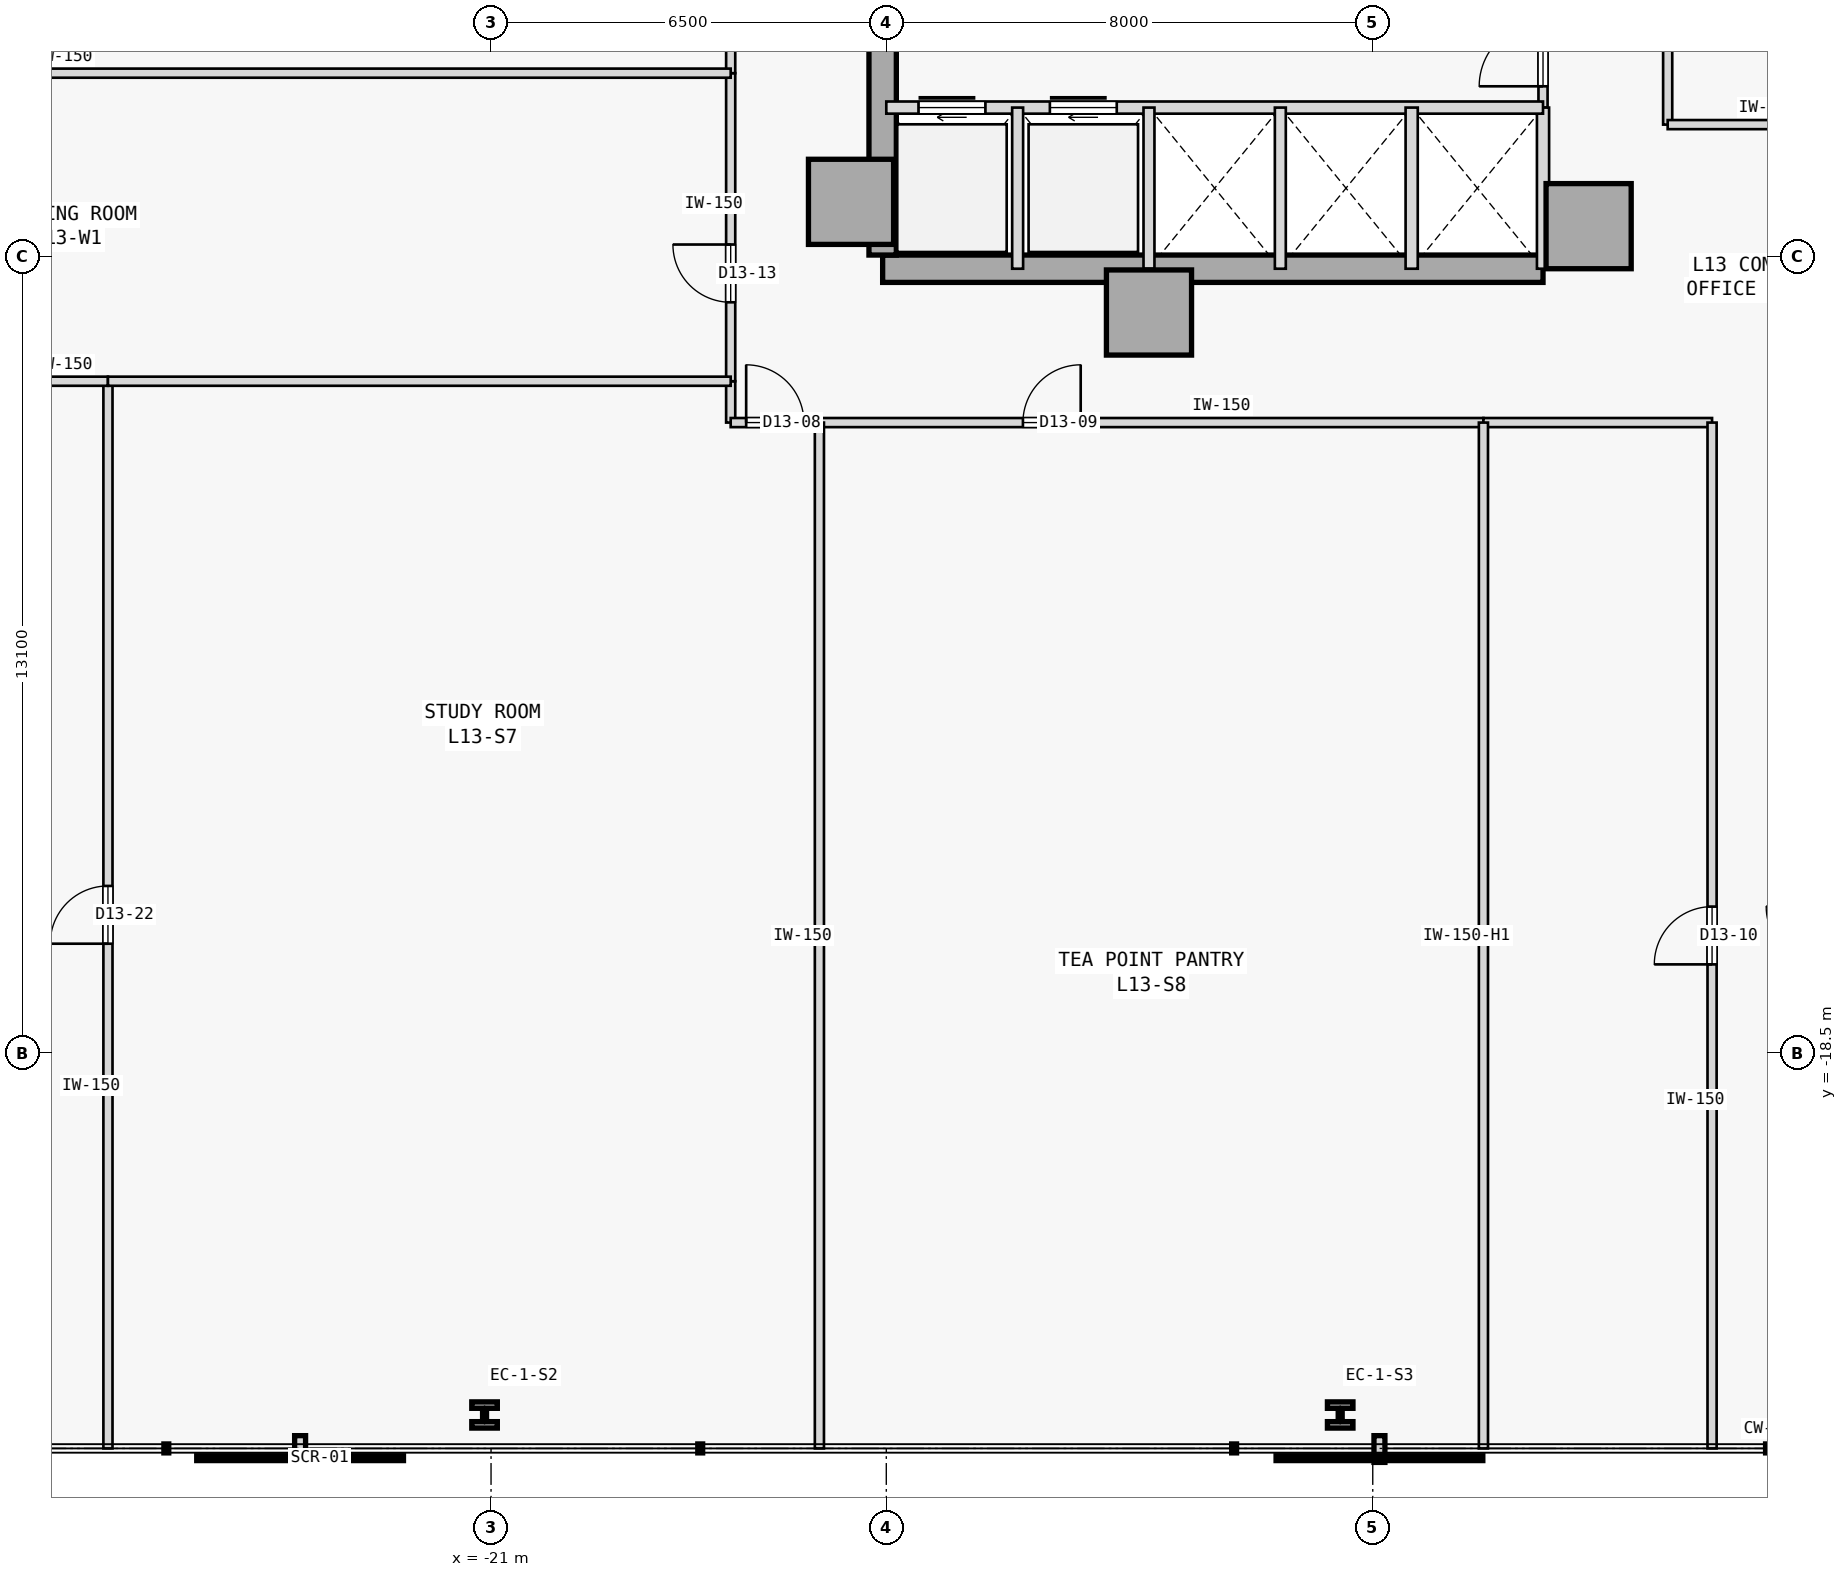
"""IFC4 building model, lengths in metres.
Left out: names, types, materials, properties, quantities, classifications, styles, units other than length and angle.
Written with IfcOpenShell. Run it as: python <this file> out.ifc"""

import sys

from ifc_helpers import new_model, si_unit, direction, frame, frame_2d, origin, origin_2d, place, context, subcontext, project, spatial, rectangle, i_section, extrude, element, fill, save


model = new_model("IFC4")
c1 = context("Model", 3, precision=1e-05, world=origin(), true_north=direction((0.0, 1.0)))
c2 = subcontext(c1, "Body", "Model", "MODEL_VIEW")
j1 = project(units=[si_unit("LENGTHUNIT", "METRE"), si_unit("PLANEANGLEUNIT", "RADIAN")], contexts=[c1])
p1 = place(None, origin())
s1 = spatial("IfcSite", under=j1, at=p1, CompositionType="ELEMENT")
p2 = place(p1, origin())
s2 = spatial("IfcBuilding", under=s1, at=p2, CompositionType="ELEMENT")
p3 = place(p2, frame((0.0, 0.0, 56.0)))
s3 = spatial("IfcBuildingStorey", under=s2, at=p3, CompositionType="ELEMENT", Elevation=56.0)
for number, where, z_axis, x_axis in (
    (1, (-15.08, -4.5, 0.0), (0.0, 0.0, 1.0), (1.0, 0.0, 0.0)),
    (2, (-10.18, -6.32, 0.0), (0.0, 0.0, 1.0), (1.0, 0.0, 0.0)),
    (3, (-2.95, -4.9, 0.0), (0.0, 0.0, 1.0), (1.0, 0.0, 0.0)),
):
    element("IfcColumn", number, at=place(p3, frame(where, z_axis=z_axis, x_axis=x_axis)), inside=s3, PredefinedType="COLUMN", context=c2, shape_type="SweptSolid", body=[
        extrude(rectangle(XDim=1.4, YDim=1.4, at=origin_2d()), origin(), (0.0, 0.0, 1.0), 3.8),
    ])
p4 = place(p3, frame((-14.56, -5.6, 0.0), z_axis=(0.0, 0.0, 1.0), x_axis=(1.0, 0.0, 0.0)))
e4 = element("IfcWall", 4, at=p4, inside=s3, PredefinedType="SHEAR", context=c2, shape_type="SweptSolid", body=[
    extrude(rectangle(XDim=10.86, YDim=0.45, at=frame_2d((5.43, 0.0))), origin(), (0.0, 0.0, 1.0), 3.575),
])
p5 = place(p3, frame((-14.56, -5.375, 0.0), z_axis=(0.0, 0.0, 1.0), x_axis=(0.0, 1.0, 0.0)))
e5 = element("IfcWall", 5, at=p5, inside=s3, PredefinedType="SHEAR", context=c2, shape_type="SweptSolid", body=[
    extrude(rectangle(XDim=10.75, YDim=0.45, at=frame_2d((5.375, 0.0))), origin(), (0.0, 0.0, 1.0), 3.575),
])
for number, where, z_axis, x_axis in (
    (6, (-21.107, -24.45, 0.0), (0.0, 0.0, 1.0), (1.0, 0.0, 0.0)),
    (7, (-7.036, -24.45, 0.0), (0.0, 0.0, 1.0), (1.0, 0.0, 0.0)),
):
    element("IfcColumn", number, at=place(p3, frame(where, z_axis=z_axis, x_axis=x_axis)), inside=s3, PredefinedType="COLUMN", context=c2, shape_type="SweptSolid", body=[
        extrude(i_section(OverallWidth=0.42, OverallDepth=0.431, WebThickness=0.065, FlangeThickness=0.106, FilletRadius=0.015, at=origin_2d()), origin(), (0.0, 0.0, 1.0), 3.8),
    ])
p6 = place(p3, frame((-3.7, -2.95, 0.0), z_axis=(0.0, 0.0, 1.0), x_axis=(0.0, 1.0, 0.0)))
e8 = element("IfcWall", 8, at=p6, inside=s3, PredefinedType="PARTITIONING", context=c2, shape_type="SweptSolid", body=[
    extrude(rectangle(XDim=1.8, YDim=0.15, at=frame_2d((0.9, 0.0))), origin(), (0.0, 0.0, 1.0), 3.575),
])
p7 = place(p6, frame((0.35, 0.0, 0.0)))
e9 = element("IfcOpeningElement", 9, at=p7, cuts=e8, PredefinedType="OPENING", context=c2, shape_type="SweptSolid", body=[
    extrude(rectangle(XDim=1.05, YDim=2.18, at=frame_2d((0.525, 1.09))), frame((0.0, 0.085, 0.0), z_axis=(0.0, -1.0, 0.0), x_axis=(1.0, 0.0, 0.0)), (0.0, 0.0, 1.0), 0.17),
])
p8 = place(p3, frame((-3.7, -5.6, 0.0), z_axis=(0.0, 0.0, 1.0), x_axis=(0.0, 1.0, 0.0)))
e10 = element("IfcWall", 10, at=p8, inside=s3, PredefinedType="STANDARD", context=c2, shape_type="SweptSolid", body=[
    extrude(rectangle(XDim=2.65, YDim=0.2, at=frame_2d((1.325, 0.0))), origin(), (0.0, 0.0, 1.0), 3.575),
])
p9 = place(p3, frame((-14.5, -2.95, 0.0), z_axis=(0.0, 0.0, 1.0), x_axis=(1.0, 0.0, 0.0)))
e11 = element("IfcWall", 11, at=p9, inside=s3, PredefinedType="STANDARD", context=c2, shape_type="SweptSolid", body=[
    extrude(rectangle(XDim=10.8, YDim=0.2, at=frame_2d((5.4, 0.0))), origin(), (0.0, 0.0, 1.0), 3.575),
])
p10 = place(p9, frame((0.53, 0.0, 0.0)))
e12 = element("IfcOpeningElement", 12, at=p10, cuts=e11, PredefinedType="OPENING", context=c2, shape_type="SweptSolid", body=[
    extrude(rectangle(XDim=1.1, YDim=2.15, at=frame_2d((0.55, 1.075))), frame((0.0, 0.11, 0.0), z_axis=(0.0, -1.0, 0.0), x_axis=(1.0, 0.0, 0.0)), (0.0, 0.0, 1.0), 0.22),
])
p11 = place(p9, frame((2.69, 0.0, 0.0)))
e13 = element("IfcOpeningElement", 13, at=p11, cuts=e11, PredefinedType="OPENING", context=c2, shape_type="SweptSolid", body=[
    extrude(rectangle(XDim=1.1, YDim=2.15, at=frame_2d((0.55, 1.075))), frame((0.0, 0.11, 0.0), z_axis=(0.0, -1.0, 0.0), x_axis=(1.0, 0.0, 0.0)), (0.0, 0.0, 1.0), 0.22),
])
p12 = place(p3, frame((-5.86, -5.6, 0.0), z_axis=(0.0, 0.0, 1.0), x_axis=(0.0, 1.0, 0.0)))
e14 = element("IfcWall", 14, at=p12, inside=s3, PredefinedType="STANDARD", context=c2, shape_type="SweptSolid", body=[
    extrude(rectangle(XDim=2.65, YDim=0.2, at=frame_2d((1.325, 0.0))), origin(), (0.0, 0.0, 1.0), 3.575),
])
for number, where, z_axis, x_axis in (
    (15, (-12.34, -5.6, 0.0), (0.0, 0.0, 1.0), (0.0, 1.0, 0.0)),
    (16, (-10.18, -5.6, 0.0), (0.0, 0.0, 1.0), (0.0, 1.0, 0.0)),
    (17, (-8.02, -5.6, 0.0), (0.0, 0.0, 1.0), (0.0, 1.0, 0.0)),
):
    element("IfcWall", number, at=place(p3, frame(where, z_axis=z_axis, x_axis=x_axis)), inside=s3, PredefinedType="STANDARD", context=c2, shape_type="SweptSolid", body=[
        extrude(rectangle(XDim=2.65, YDim=0.18, at=frame_2d((1.325, 0.0))), origin(), (0.0, 0.0, 1.0), 3.575),
    ])
p13 = place(p3, frame((-1.65, -3.23, 0.0), z_axis=(0.0, 0.0, 1.0), x_axis=(0.0, 1.0, 0.0)))
e18 = element("IfcWall", 18, at=p13, inside=s3, PredefinedType="PARTITIONING", context=c2, shape_type="SweptSolid", body=[
    extrude(rectangle(XDim=6.46, YDim=0.15, at=frame_2d((3.23, 0.0))), origin(), (0.0, 0.0, 1.0), 3.575),
])
p14 = place(p13, frame((2.755, 0.0, 0.0)))
e19 = element("IfcOpeningElement", 19, at=p14, cuts=e18, PredefinedType="OPENING", context=c2, shape_type="SweptSolid", body=[
    extrude(rectangle(XDim=0.95, YDim=2.15, at=frame_2d((0.475, 1.075))), frame((0.0, 0.085, 0.0), z_axis=(0.0, -1.0, 0.0), x_axis=(1.0, 0.0, 0.0)), (0.0, 0.0, 1.0), 0.17),
])
p15 = place(p3, frame((-1.65, -3.23, 0.0), z_axis=(0.0, 0.0, 1.0), x_axis=(1.0, 0.0, 0.0)))
e20 = element("IfcWall", 20, at=p15, inside=s3, PredefinedType="PARTITIONING", context=c2, shape_type="SweptSolid", body=[
    extrude(rectangle(XDim=3.3, YDim=0.15, at=frame_2d((1.65, 0.0))), origin(), (0.0, 0.0, 1.0), 3.575),
])
p16 = place(p3, frame((-17.059, -8.13, 0.0), z_axis=(0.0, 0.0, 1.0), x_axis=(0.0, 1.0, 0.0)))
e21 = element("IfcWall", 21, at=p16, inside=s3, PredefinedType="PARTITIONING", context=c2, shape_type="SweptSolid", body=[
    extrude(rectangle(XDim=0.68, YDim=0.15, at=frame_2d((0.34, 0.0))), origin(), (0.0, 0.0, 1.0), 3.575),
])
p17 = place(p3, frame((-17.059, -8.13, 0.0), z_axis=(0.0, 0.0, 1.0), x_axis=(1.0, 0.0, 0.0)))
e22 = element("IfcWall", 22, at=p17, inside=s3, PredefinedType="PARTITIONING", context=c2, shape_type="SweptSolid", body=[
    extrude(rectangle(XDim=1.459, YDim=0.15, at=frame_2d((0.729, 0.0))), origin(), (0.0, 0.0, 1.0), 3.575),
])
p18 = place(p17, frame((0.254, 0.0, 0.0)))
e23 = element("IfcOpeningElement", 23, at=p18, cuts=e22, PredefinedType="OPENING", context=c2, shape_type="SweptSolid", body=[
    extrude(rectangle(XDim=0.95, YDim=2.15, at=frame_2d((0.475, 1.075))), frame((0.0, 0.085, 0.0), z_axis=(0.0, -1.0, 0.0), x_axis=(1.0, 0.0, 0.0)), (0.0, 0.0, 1.0), 0.17),
])
p19 = place(p3, frame((-15.6, -8.13, 0.0), z_axis=(0.0, 0.0, 1.0), x_axis=(1.0, 0.0, 0.0)))
e24 = element("IfcWall", 24, at=p19, inside=s3, PredefinedType="PARTITIONING", context=c2, shape_type="SweptSolid", body=[
    extrude(rectangle(XDim=10.92, YDim=0.15, at=frame_2d((5.46, 0.0))), origin(), (0.0, 0.0, 1.0), 3.575),
])
p20 = place(p19, frame((3.347, 0.0, 0.0)))
e25 = element("IfcOpeningElement", 25, at=p20, cuts=e24, PredefinedType="OPENING", context=c2, shape_type="SweptSolid", body=[
    extrude(rectangle(XDim=0.95, YDim=2.15, at=frame_2d((0.475, 1.075))), frame((0.0, 0.085, 0.0), z_axis=(0.0, -1.0, 0.0), x_axis=(1.0, 0.0, 0.0)), (0.0, 0.0, 1.0), 0.17),
])
p21 = place(p3, frame((-4.68, -8.13, 0.0), z_axis=(0.0, 0.0, 1.0), x_axis=(1.0, 0.0, 0.0)))
e26 = element("IfcWall", 26, at=p21, inside=s3, PredefinedType="PARTITIONING", context=c2, shape_type="SweptSolid", body=[
    extrude(rectangle(XDim=3.76, YDim=0.15, at=frame_2d((1.88, 0.0))), origin(), (0.0, 0.0, 1.0), 3.575),
])
p22 = place(p3, frame((-0.92, -25.0, 0.0), z_axis=(0.0, 0.0, 1.0), x_axis=(0.0, 1.0, 0.0)))
e27 = element("IfcWall", 27, at=p22, inside=s3, PredefinedType="PARTITIONING", context=c2, shape_type="SweptSolid", body=[
    extrude(rectangle(XDim=16.87, YDim=0.15, at=frame_2d((8.435, 0.0))), origin(), (0.0, 0.0, 1.0), 3.575),
])
p23 = place(p22, frame((7.96, 0.0, 0.0)))
e28 = element("IfcOpeningElement", 28, at=p23, cuts=e27, PredefinedType="OPENING", context=c2, shape_type="SweptSolid", body=[
    extrude(rectangle(XDim=0.95, YDim=2.15, at=frame_2d((0.475, 1.075))), frame((0.0, 0.085, 0.0), z_axis=(0.0, -1.0, 0.0), x_axis=(1.0, 0.0, 0.0)), (0.0, 0.0, 1.0), 0.17),
])
p24 = place(p3, frame((-17.059, -7.45, 0.0), z_axis=(0.0, 0.0, 1.0), x_axis=(0.0, 1.0, 0.0)))
e29 = element("IfcWall", 29, at=p24, inside=s3, PredefinedType="PARTITIONING", context=c2, shape_type="SweptSolid", body=[
    extrude(rectangle(XDim=5.066, YDim=0.15, at=frame_2d((2.533, 0.0))), origin(), (0.0, 0.0, 1.0), 3.575),
])
p25 = place(p24, frame((1.298, 0.0, 0.0)))
e30 = element("IfcOpeningElement", 30, at=p25, cuts=e29, PredefinedType="OPENING", context=c2, shape_type="SweptSolid", body=[
    extrude(rectangle(XDim=0.95, YDim=2.15, at=frame_2d((0.475, 1.075))), frame((0.0, 0.085, 0.0), z_axis=(0.0, -1.0, 0.0), x_axis=(1.0, 0.0, 0.0)), (0.0, 0.0, 1.0), 0.17),
])
p26 = place(p3, frame((-17.059, -2.384, 0.0), z_axis=(0.0, 0.0, 1.0), x_axis=(0.0, 1.0, 0.0)))
e31 = element("IfcWall", 31, at=p26, inside=s3, PredefinedType="PARTITIONING", context=c2, shape_type="SweptSolid", body=[
    extrude(rectangle(XDim=1.464, YDim=0.15, at=frame_2d((0.732, 0.0))), origin(), (0.0, 0.0, 1.0), 3.575),
])
p27 = place(p3, frame((-27.3, -25.0, 0.0), z_axis=(0.0, 0.0, 1.0), x_axis=(0.0, 1.0, 0.0)))
e32 = element("IfcWall", 32, at=p27, inside=s3, PredefinedType="PARTITIONING", context=c2, shape_type="SweptSolid", body=[
    extrude(rectangle(XDim=17.55, YDim=0.15, at=frame_2d((8.775, 0.0))), origin(), (0.0, 0.0, 1.0), 3.575),
])
p28 = place(p27, frame((8.3, 0.0, 0.0)))
e33 = element("IfcOpeningElement", 33, at=p28, cuts=e32, PredefinedType="OPENING", context=c2, shape_type="SweptSolid", body=[
    extrude(rectangle(XDim=0.95, YDim=2.15, at=frame_2d((0.475, 1.075))), frame((0.0, 0.085, 0.0), z_axis=(0.0, -1.0, 0.0), x_axis=(1.0, 0.0, 0.0)), (0.0, 0.0, 1.0), 0.17),
])
p29 = place(p3, frame((-39.0, -7.45, 0.0), z_axis=(0.0, 0.0, 1.0), x_axis=(1.0, 0.0, 0.0)))
e34 = element("IfcWall", 34, at=p29, inside=s3, PredefinedType="PARTITIONING", context=c2, shape_type="SweptSolid", body=[
    extrude(rectangle(XDim=11.7, YDim=0.15, at=frame_2d((5.85, 0.0))), origin(), (0.0, 0.0, 1.0), 3.575),
])
p30 = place(p3, frame((-15.6, -25.0, 0.0), z_axis=(0.0, 0.0, 1.0), x_axis=(0.0, 1.0, 0.0)))
e35 = element("IfcWall", 35, at=p30, inside=s3, PredefinedType="PARTITIONING", context=c2, shape_type="SweptSolid", body=[
    extrude(rectangle(XDim=16.87, YDim=0.15, at=frame_2d((8.435, 0.0))), origin(), (0.0, 0.0, 1.0), 3.575),
])
p31 = place(p3, frame((-27.3, -7.45, 0.0), z_axis=(0.0, 0.0, 1.0), x_axis=(1.0, 0.0, 0.0)))
e36 = element("IfcWall", 36, at=p31, inside=s3, PredefinedType="PARTITIONING", context=c2, shape_type="SweptSolid", body=[
    extrude(rectangle(XDim=10.241, YDim=0.15, at=frame_2d((5.121, 0.0))), origin(), (0.0, 0.0, 1.0), 3.575),
])
p32 = place(p3, frame((-4.68, -25.0, 0.0), z_axis=(0.0, 0.0, 1.0), x_axis=(0.0, 1.0, 0.0)))
e37 = element("IfcWall", 37, at=p32, inside=s3, PredefinedType="PARTITIONING", context=c2, shape_type="SweptSolid", body=[
    extrude(rectangle(XDim=16.87, YDim=0.15, at=frame_2d((8.435, 0.0))), origin(), (0.0, 0.0, 1.0), 3.125),
])
p33 = place(p3, frame((-39.0, -2.384, 0.0), z_axis=(0.0, 0.0, 1.0), x_axis=(1.0, 0.0, 0.0)))
e38 = element("IfcWall", 38, at=p33, inside=s3, PredefinedType="PARTITIONING", context=c2, shape_type="SweptSolid", body=[
    extrude(rectangle(XDim=21.941, YDim=0.15, at=frame_2d((10.97, 0.0))), origin(), (0.0, 0.0, 1.0), 3.575),
])
p34 = place(p7, origin())
e39 = element("IfcDoor", 39, at=p34, inside=s3, OperationType="SINGLE_SWING_LEFT", PredefinedType="DOOR", context=c2, shape_type="SweptSolid", body=[
    extrude(rectangle(XDim=1.05, YDim=2.18, at=frame_2d((0.525, 1.09))), frame((0.0, 0.025, 0.0), z_axis=(0.0, -1.0, 0.0), x_axis=(1.0, 0.0, 0.0)), (0.0, 0.0, 1.0), 0.05),
])
fill(e9, e39)
p35 = place(p10, origin())
e40 = element("IfcDoor", 40, at=p35, inside=s3, OperationType="SLIDING_TO_RIGHT", PredefinedType="DOOR", context=c2, shape_type="SweptSolid", body=[
    extrude(rectangle(XDim=1.1, YDim=2.15, at=frame_2d((0.55, 1.075))), frame((0.0, 0.025, 0.0), z_axis=(0.0, -1.0, 0.0), x_axis=(1.0, 0.0, 0.0)), (0.0, 0.0, 1.0), 0.05),
])
fill(e12, e40)
p36 = place(p11, origin())
e41 = element("IfcDoor", 41, at=p36, inside=s3, OperationType="SLIDING_TO_RIGHT", PredefinedType="DOOR", context=c2, shape_type="SweptSolid", body=[
    extrude(rectangle(XDim=1.1, YDim=2.15, at=frame_2d((0.55, 1.075))), frame((0.0, 0.025, 0.0), z_axis=(0.0, -1.0, 0.0), x_axis=(1.0, 0.0, 0.0)), (0.0, 0.0, 1.0), 0.05),
])
fill(e13, e41)
p37 = place(p18, origin())
e42 = element("IfcDoor", 42, at=p37, inside=s3, OperationType="SINGLE_SWING_LEFT", PredefinedType="DOOR", context=c2, shape_type="SweptSolid", body=[
    extrude(rectangle(XDim=0.95, YDim=2.15, at=frame_2d((0.475, 1.075))), frame((0.0, 0.025, 0.0), z_axis=(0.0, -1.0, 0.0), x_axis=(1.0, 0.0, 0.0)), (0.0, 0.0, 1.0), 0.05),
])
fill(e23, e42)
p38 = place(p20, origin())
e43 = element("IfcDoor", 43, at=p38, inside=s3, OperationType="SINGLE_SWING_RIGHT", PredefinedType="DOOR", context=c2, shape_type="SweptSolid", body=[
    extrude(rectangle(XDim=0.95, YDim=2.15, at=frame_2d((0.475, 1.075))), frame((0.0, 0.025, 0.0), z_axis=(0.0, -1.0, 0.0), x_axis=(1.0, 0.0, 0.0)), (0.0, 0.0, 1.0), 0.05),
])
fill(e25, e43)
p39 = place(p23, origin())
e44 = element("IfcDoor", 44, at=p39, inside=s3, OperationType="SINGLE_SWING_LEFT", PredefinedType="DOOR", context=c2, shape_type="SweptSolid", body=[
    extrude(rectangle(XDim=0.95, YDim=2.15, at=frame_2d((0.475, 1.075))), frame((0.0, 0.025, 0.0), z_axis=(0.0, -1.0, 0.0), x_axis=(1.0, 0.0, 0.0)), (0.0, 0.0, 1.0), 0.05),
])
fill(e28, e44)
p40 = place(p25, origin())
e45 = element("IfcDoor", 45, at=p40, inside=s3, OperationType="SINGLE_SWING_RIGHT", PredefinedType="DOOR", context=c2, shape_type="SweptSolid", body=[
    extrude(rectangle(XDim=0.95, YDim=2.15, at=frame_2d((0.475, 1.075))), frame((0.0, 0.025, 0.0), z_axis=(0.0, -1.0, 0.0), x_axis=(1.0, 0.0, 0.0)), (0.0, 0.0, 1.0), 0.05),
])
fill(e30, e45)
p41 = place(p28, origin())
e46 = element("IfcDoor", 46, at=p41, inside=s3, OperationType="SINGLE_SWING_LEFT", PredefinedType="DOOR", context=c2, shape_type="SweptSolid", body=[
    extrude(rectangle(XDim=0.95, YDim=2.15, at=frame_2d((0.475, 1.075))), frame((0.0, 0.025, 0.0), z_axis=(0.0, -1.0, 0.0), x_axis=(1.0, 0.0, 0.0)), (0.0, 0.0, 1.0), 0.05),
])
fill(e33, e46)
save(model, sys.argv[1])
